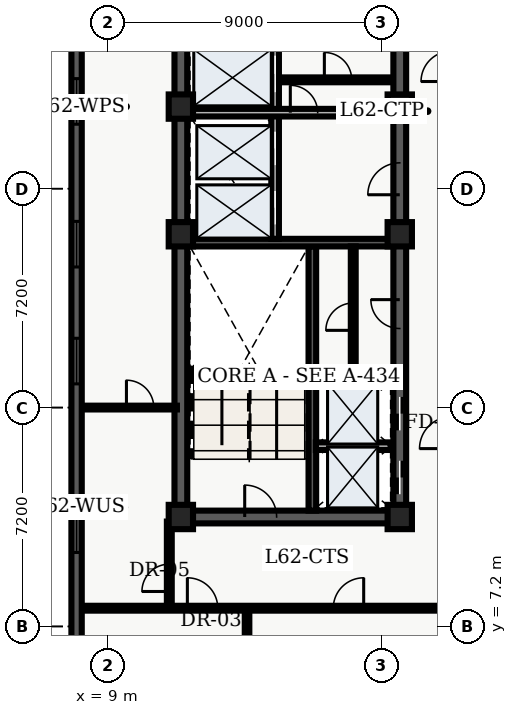
"""IFC4 building model, lengths in metres.
Left out: names, types, materials, properties, quantities, classifications, styles, units other than length and angle.
Written with IfcOpenShell. Run it as: python <this file> out.ifc"""

import sys

from ifc_helpers import new_model, entity, si_unit, converted_unit, direction, frame, origin_with_axes, origin_2d_with_axis, place, context, subcontext, project, spatial, polyline, rectangle, outline, extrude, element, fill, save


model = new_model("IFC4")
c1 = context("Model", 3, precision=1e-05, world=origin_with_axes(), true_north=direction((0.0, 1.0)))
c2 = subcontext(c1, "Body", "Model", "MODEL_VIEW")
j1 = project(units=[si_unit("LENGTHUNIT", "METRE"), converted_unit("PLANEANGLEUNIT", "DEGREE", entity("IfcPlaneAngleMeasure", 0.017), si_unit("PLANEANGLEUNIT", "RADIAN"), dimensions=[0, 0, 0, 0, 0, 0, 0])], contexts=[c1])
p1 = place(None, origin_with_axes())
s1 = spatial("IfcSite", under=j1, at=p1, CompositionType="ELEMENT")
p2 = place(p1, origin_with_axes())
s2 = spatial("IfcBuilding", under=s1, at=p2, CompositionType="ELEMENT")
p3 = place(p2, frame((0.0, 0.0, 252.9), z_axis=(0.0, 0.0, 1.0), x_axis=(1.0, 0.0, 0.0)))
s3 = spatial("IfcBuildingStorey", under=s2, at=p3, CompositionType="ELEMENT", Elevation=252.9)
p4 = place(p3, frame((11.4, 10.8, 0.0), z_axis=(0.0, 0.0, 1.0), x_axis=(0.0, 1.0, 0.0)))
e1 = element("IfcWall", 1, at=p4, inside=s3, PredefinedType="SHEAR", context=c2, shape_type="SweptSolid", body=[
    extrude(outline(polyline([(0.0, -0.21), (27.0, -0.21), (27.0, 0.21), (0.0, 0.21), (0.0, -0.21)])), origin_with_axes(), (0.0, 0.0, 1.0), 3.66),
])
p5 = place(p3, frame((11.4, 10.8, 0.0), z_axis=(0.0, 0.0, 1.0), x_axis=(1.0, 0.0, 0.0)))
e2 = element("IfcWall", 2, at=p5, inside=s3, PredefinedType="SHEAR", context=c2, shape_type="SweptSolid", body=[
    extrude(outline(polyline([(0.0, -0.21), (7.2, -0.21), (7.2, 0.21), (0.0, 0.21), (0.0, -0.21)])), origin_with_axes(), (0.0, 0.0, 1.0), 3.66),
])
p6 = place(p5, frame((2.625, 0.0, 0.0), z_axis=(0.0, 0.0, 1.0), x_axis=(1.0, 0.0, 0.0)))
e3 = element("IfcOpeningElement", 3, at=p6, cuts=e2, PredefinedType="OPENING", context=c2, shape_type="SweptSolid", body=[
    extrude(rectangle(XDim=1.05, YDim=0.44, at=origin_2d_with_axis()), origin_with_axes(), (0.0, 0.0, 1.0), 2.15),
])
p7 = place(p3, frame((18.6, 10.8, 0.0), z_axis=(0.0, 0.0, 1.0), x_axis=(0.0, 1.0, 0.0)))
e4 = element("IfcWall", 4, at=p7, inside=s3, PredefinedType="SHEAR", context=c2, shape_type="SweptSolid", body=[
    extrude(outline(polyline([(0.0, -0.21), (13.5, -0.21), (13.5, 0.21), (0.0, 0.21), (0.0, -0.21)])), origin_with_axes(), (0.0, 0.0, 1.0), 3.66),
])
p8 = place(p7, frame((1.3, 0.0, 0.0), z_axis=(0.0, 0.0, 1.0), x_axis=(1.0, 0.0, 0.0)))
e5 = element("IfcOpeningElement", 5, at=p8, cuts=e4, PredefinedType="OPENING", context=c2, shape_type="SweptSolid", body=[
    extrude(rectangle(XDim=1.1, YDim=0.44, at=origin_2d_with_axis()), origin_with_axes(), (0.0, 0.0, 1.0), 2.15),
])
p9 = place(p7, frame((3.4, 0.0, 0.0), z_axis=(0.0, 0.0, 1.0), x_axis=(1.0, 0.0, 0.0)))
e6 = element("IfcOpeningElement", 6, at=p9, cuts=e4, PredefinedType="OPENING", context=c2, shape_type="SweptSolid", body=[
    extrude(rectangle(XDim=1.1, YDim=0.44, at=origin_2d_with_axis()), origin_with_axes(), (0.0, 0.0, 1.0), 2.15),
])
p10 = place(p7, frame((11.125, 0.0, 0.0), z_axis=(0.0, 0.0, 1.0), x_axis=(1.0, 0.0, 0.0)))
e7 = element("IfcOpeningElement", 7, at=p10, cuts=e4, PredefinedType="OPENING", context=c2, shape_type="SweptSolid", body=[
    extrude(rectangle(XDim=1.05, YDim=0.44, at=origin_2d_with_axis()), origin_with_axes(), (0.0, 0.0, 1.0), 2.15),
])
p11 = place(p7, frame((6.675, 0.0, 0.0), z_axis=(0.0, 0.0, 1.0), x_axis=(1.0, 0.0, 0.0)))
e8 = element("IfcOpeningElement", 8, at=p11, cuts=e4, PredefinedType="OPENING", context=c2, shape_type="SweptSolid", body=[
    extrude(rectangle(XDim=0.95, YDim=0.44, at=origin_2d_with_axis()), origin_with_axes(), (0.0, 0.0, 1.0), 2.15),
])
p12 = place(p3, frame((18.6, 24.3, 0.0), z_axis=(0.0, 0.0, 1.0), x_axis=(0.0, 1.0, 0.0)))
e9 = element("IfcWall", 9, at=p12, inside=s3, PredefinedType="SHEAR", context=c2, shape_type="SweptSolid", body=[
    extrude(outline(polyline([(0.0, -0.21), (13.5, -0.21), (13.5, 0.21), (0.0, 0.21), (0.0, -0.21)])), origin_with_axes(), (0.0, 0.0, 1.0), 3.66),
])
p13 = place(p12, frame((6.725, 0.0, 0.0), z_axis=(0.0, 0.0, 1.0), x_axis=(1.0, 0.0, 0.0)))
e10 = element("IfcOpeningElement", 10, at=p13, cuts=e9, PredefinedType="OPENING", context=c2, shape_type="SweptSolid", body=[
    extrude(rectangle(XDim=1.05, YDim=0.44, at=origin_2d_with_axis()), origin_with_axes(), (0.0, 0.0, 1.0), 2.15),
])
p14 = place(p12, frame((11.125, 0.0, 0.0), z_axis=(0.0, 0.0, 1.0), x_axis=(1.0, 0.0, 0.0)))
e11 = element("IfcOpeningElement", 11, at=p14, cuts=e9, PredefinedType="OPENING", context=c2, shape_type="SweptSolid", body=[
    extrude(rectangle(XDim=1.05, YDim=0.44, at=origin_2d_with_axis()), origin_with_axes(), (0.0, 0.0, 1.0), 2.15),
])
p15 = place(p3, frame((15.725, 11.01, 0.0), z_axis=(0.0, 0.0, 1.0), x_axis=(0.0, 1.0, 0.0)))
e12 = element("IfcWall", 12, at=p15, inside=s3, PredefinedType="SHEAR", context=c2, shape_type="SweptSolid", body=[
    extrude(outline(polyline([(0.0, -0.125), (8.69, -0.125), (8.69, 0.125), (0.0, 0.125), (0.0, -0.125)])), origin_with_axes(), (0.0, 0.0, 1.0), 3.66),
])
p16 = place(p3, frame((11.61, 19.825, 0.0), z_axis=(0.0, 0.0, 1.0), x_axis=(1.0, 0.0, 0.0)))
e13 = element("IfcWall", 13, at=p16, inside=s3, PredefinedType="SHEAR", context=c2, shape_type="SweptSolid", body=[
    extrude(outline(polyline([(0.0, -0.125), (6.78, -0.125), (6.78, 0.125), (0.0, 0.125), (0.0, -0.125)])), origin_with_axes(), (0.0, 0.0, 1.0), 3.66),
])
p17 = place(p3, frame((14.5, 19.95, 0.0), z_axis=(0.0, 0.0, 1.0), x_axis=(0.0, 1.0, 0.0)))
e14 = element("IfcWall", 14, at=p17, inside=s3, PredefinedType="SOLIDWALL", context=c2, shape_type="SweptSolid", body=[
    extrude(outline(polyline([(0.0, -0.125), (6.25, -0.125), (6.25, 0.125), (0.0, 0.125), (0.0, -0.125)])), origin_with_axes(), (0.0, 0.0, 1.0), 2.7),
])
p18 = place(p17, frame((1.025, 0.0, 0.0), z_axis=(0.0, 0.0, 1.0), x_axis=(1.0, 0.0, 0.0)))
e15 = element("IfcOpeningElement", 15, at=p18, cuts=e14, PredefinedType="OPENING", context=c2, shape_type="SweptSolid", body=[
    extrude(rectangle(XDim=1.1, YDim=0.27, at=origin_2d_with_axis()), origin_with_axes(), (0.0, 0.0, 1.0), 2.15),
])
p19 = place(p17, frame((2.975, 0.0, 0.0), z_axis=(0.0, 0.0, 1.0), x_axis=(1.0, 0.0, 0.0)))
e16 = element("IfcOpeningElement", 16, at=p19, cuts=e14, PredefinedType="OPENING", context=c2, shape_type="SweptSolid", body=[
    extrude(rectangle(XDim=1.1, YDim=0.27, at=origin_2d_with_axis()), origin_with_axes(), (0.0, 0.0, 1.0), 2.15),
])
p20 = place(p17, frame((5.425, 0.0, 0.0), z_axis=(0.0, 0.0, 1.0), x_axis=(1.0, 0.0, 0.0)))
e17 = element("IfcOpeningElement", 17, at=p20, cuts=e14, PredefinedType="OPENING", context=c2, shape_type="SweptSolid", body=[
    extrude(rectangle(XDim=1.2, YDim=0.27, at=origin_2d_with_axis()), origin_with_axes(), (0.0, 0.0, 1.0), 2.15),
])
p21 = place(p3, frame((11.7, 24.1, 0.0), z_axis=(0.0, 0.0, 1.0), x_axis=(1.0, 0.0, 0.0)))
e18 = element("IfcWall", 18, at=p21, inside=s3, PredefinedType="SOLIDWALL", context=c2, shape_type="SweptSolid", body=[
    extrude(outline(polyline([(0.0, -0.125), (6.6, -0.125), (6.6, 0.125), (0.0, 0.125), (0.0, -0.125)])), origin_with_axes(), (0.0, 0.0, 1.0), 2.7),
])
p22 = place(p21, frame((3.75, 0.0, 0.0), z_axis=(0.0, 0.0, 1.0), x_axis=(1.0, 0.0, 0.0)))
e19 = element("IfcOpeningElement", 19, at=p22, cuts=e18, PredefinedType="OPENING", context=c2, shape_type="SweptSolid", body=[
    extrude(rectangle(XDim=0.9, YDim=0.27, at=origin_2d_with_axis()), origin_with_axes(), (0.0, 0.0, 1.0), 2.15),
])
for number, where, z_axis, x_axis in (
    (20, (11.4, 10.8, 0.0), (0.0, 0.0, 1.0), (1.0, 0.0, 0.0)),
    (21, (11.4, 20.1, 0.0), (0.0, 0.0, 1.0), (1.0, 0.0, 0.0)),
    (22, (11.4, 24.3, 0.0), (0.0, 0.0, 1.0), (1.0, 0.0, 0.0)),
    (23, (18.6, 10.8, 0.0), (0.0, 0.0, 1.0), (1.0, 0.0, 0.0)),
    (24, (18.6, 20.1, 0.0), (0.0, 0.0, 1.0), (1.0, 0.0, 0.0)),
    (25, (18.6, 24.3, 0.0), (0.0, 0.0, 1.0), (1.0, 0.0, 0.0)),
):
    element("IfcColumn", number, at=place(p3, frame(where, z_axis=z_axis, x_axis=x_axis)), inside=s3, PredefinedType="COLUMN", context=c2, shape_type="SweptSolid", body=[
        extrude(rectangle(XDim=0.8, YDim=0.8, at=origin_2d_with_axis()), origin_with_axes(), (0.0, 0.0, 1.0), 3.9),
    ])
p23 = place(p3, frame((14.62, 25.18, 0.0), z_axis=(0.0, 0.0, 1.0), x_axis=(1.0, 0.0, 0.0)))
e26 = element("IfcWall", 26, at=p23, inside=s3, PredefinedType="PARTITIONING", context=c2, shape_type="SweptSolid", body=[
    extrude(outline(polyline([(0.0, -0.08), (3.68, -0.08), (3.68, 0.08), (0.0, 0.08), (0.0, -0.08)])), origin_with_axes(), (0.0, 0.0, 1.0), 2.7),
])
p24 = place(p23, frame((1.95, 0.0, 0.0), z_axis=(0.0, 0.0, 1.0), x_axis=(1.0, 0.0, 0.0)))
e27 = element("IfcOpeningElement", 27, at=p24, cuts=e26, PredefinedType="OPENING", context=c2, shape_type="SweptSolid", body=[
    extrude(rectangle(XDim=0.9, YDim=0.18, at=origin_2d_with_axis()), origin_with_axes(), (0.0, 0.0, 1.0), 2.15),
])
for number, where, z_axis, x_axis in (
    (28, (15.84, 13.13, 0.0), (0.0, 0.0, 1.0), (1.0, 0.0, 0.0)),
    (29, (15.84, 15.27, 0.0), (0.0, 0.0, 1.0), (1.0, 0.0, 0.0)),
):
    element("IfcWall", number, at=place(p3, frame(where, z_axis=z_axis, x_axis=x_axis)), inside=s3, PredefinedType="SOLIDWALL", context=c2, shape_type="SweptSolid", body=[
        extrude(outline(polyline([(0.0, -0.125), (2.46, -0.125), (2.46, 0.125), (0.0, 0.125), (0.0, -0.125)])), origin_with_axes(), (0.0, 0.0, 1.0), 2.7),
    ])
p25 = place(p3, frame((17.07, 15.34, 0.0), z_axis=(0.0, 0.0, 1.0), x_axis=(0.0, 1.0, 0.0)))
e30 = element("IfcWall", 30, at=p25, inside=s3, PredefinedType="PARTITIONING", context=c2, shape_type="SweptSolid", body=[
    extrude(outline(polyline([(0.0, -0.08), (4.36, -0.08), (4.36, 0.08), (0.0, 0.08), (0.0, -0.08)])), origin_with_axes(), (0.0, 0.0, 1.0), 2.7),
])
p26 = place(p25, frame((2.05, 0.0, 0.0), z_axis=(0.0, 0.0, 1.0), x_axis=(1.0, 0.0, 0.0)))
e31 = element("IfcOpeningElement", 31, at=p26, cuts=e30, PredefinedType="OPENING", context=c2, shape_type="SweptSolid", body=[
    extrude(rectangle(XDim=0.9, YDim=0.18, at=origin_2d_with_axis()), origin_with_axes(), (0.0, 0.0, 1.0), 2.15),
])
p27 = place(p3, frame((8.135, 7.8, 0.0), z_axis=(0.0, 0.0, 1.0), x_axis=(1.0, 0.0, 0.0)))
e32 = element("IfcWall", 32, at=p27, inside=s3, PredefinedType="PARTITIONING", context=c2, shape_type="SweptSolid", body=[
    extrude(outline(polyline([(0.0, -0.08), (12.165, -0.08), (12.165, 0.08), (0.0, 0.08), (0.0, -0.08)])), origin_with_axes(), (0.0, 0.0, 1.0), 2.7),
])
p28 = place(p27, frame((3.979, 0.0, 0.0), z_axis=(0.0, 0.0, 1.0), x_axis=(1.0, 0.0, 0.0)))
e33 = element("IfcOpeningElement", 33, at=p28, cuts=e32, PredefinedType="OPENING", context=c2, shape_type="SweptSolid", body=[
    extrude(rectangle(XDim=1.0, YDim=0.18, at=origin_2d_with_axis()), origin_with_axes(), (0.0, 0.0, 1.0), 2.15),
])
p29 = place(p27, frame((8.778, 0.0, 0.0), z_axis=(0.0, 0.0, 1.0), x_axis=(1.0, 0.0, 0.0)))
e34 = element("IfcOpeningElement", 34, at=p29, cuts=e32, PredefinedType="OPENING", context=c2, shape_type="SweptSolid", body=[
    extrude(rectangle(XDim=1.0, YDim=0.18, at=origin_2d_with_axis()), origin_with_axes(), (0.0, 0.0, 1.0), 2.15),
])
p30 = place(p3, frame((11.02, 7.8, 0.0), z_axis=(0.0, 0.0, 1.0), x_axis=(0.0, 1.0, 0.0)))
e35 = element("IfcWall", 35, at=p30, inside=s3, PredefinedType="PARTITIONING", context=c2, shape_type="SweptSolid", body=[
    extrude(outline(polyline([(0.0, -0.08), (2.85, -0.08), (2.85, 0.08), (0.0, 0.08), (0.0, -0.08)])), origin_with_axes(), (0.0, 0.0, 1.0), 2.7),
])
p31 = place(p30, frame((1.0, 0.0, 0.0), z_axis=(0.0, 0.0, 1.0), x_axis=(1.0, 0.0, 0.0)))
e36 = element("IfcOpeningElement", 36, at=p31, cuts=e35, PredefinedType="OPENING", context=c2, shape_type="SweptSolid", body=[
    extrude(rectangle(XDim=0.9, YDim=0.18, at=origin_2d_with_axis()), origin_with_axes(), (0.0, 0.0, 1.0), 2.15),
])
p32 = place(p3, frame((8.135, 14.4, 0.0), z_axis=(0.0, 0.0, 1.0), x_axis=(1.0, 0.0, 0.0)))
e37 = element("IfcWall", 37, at=p32, inside=s3, PredefinedType="PARTITIONING", context=c2, shape_type="SweptSolid", body=[
    extrude(outline(polyline([(0.0, -0.062), (3.135, -0.062), (3.135, 0.062), (0.0, 0.062), (0.0, -0.062)])), origin_with_axes(), (0.0, 0.0, 1.0), 2.7),
])
p33 = place(p32, frame((1.925, 0.0, 0.0), z_axis=(0.0, 0.0, 1.0), x_axis=(1.0, 0.0, 0.0)))
e38 = element("IfcOpeningElement", 38, at=p33, cuts=e37, PredefinedType="OPENING", context=c2, shape_type="SweptSolid", body=[
    extrude(rectangle(XDim=0.9, YDim=0.145, at=origin_2d_with_axis()), origin_with_axes(), (0.0, 0.0, 1.0), 2.15),
])
p34 = place(p3, frame((13.577, 2.58, 0.0), z_axis=(0.0, 0.0, 1.0), x_axis=(0.0, 1.0, 0.0)))
e39 = element("IfcWall", 39, at=p34, inside=s3, PredefinedType="PARTITIONING", context=c2, shape_type="SweptSolid", body=[
    extrude(outline(polyline([(0.0, -0.075), (5.12, -0.075), (5.12, 0.075), (0.0, 0.075), (0.0, -0.075)])), origin_with_axes(), (0.0, 0.0, 1.0), 2.7),
])
p35 = place(p3, frame((7.97, 2.74, 0.0), z_axis=(0.0, 0.0, 1.0), x_axis=(0.0, 1.0, 0.0)))
e40 = element("IfcWall", 40, at=p35, inside=s3, PredefinedType="SOLIDWALL", context=c2, shape_type="SweptSolid", body=[
    extrude(outline(polyline([(0.0, -0.17), (43.46, -0.17), (43.46, 0.17), (0.0, 0.17), (0.0, -0.17)])), origin_with_axes(), (0.0, 0.0, 1.0), 3.66),
])
p36 = place(p35, frame((2.948, 0.0, 0.45), z_axis=(0.0, 0.0, 1.0), x_axis=(1.0, 0.0, 0.0)))
e41 = element("IfcOpeningElement", 41, at=p36, cuts=e40, PredefinedType="OPENING", context=c2, shape_type="SweptSolid", body=[
    extrude(rectangle(XDim=1.5, YDim=0.36, at=origin_2d_with_axis()), origin_with_axes(), (0.0, 0.0, 1.0), 2.1),
])
p37 = place(p35, frame((7.643, 0.0, 0.45), z_axis=(0.0, 0.0, 1.0), x_axis=(1.0, 0.0, 0.0)))
e42 = element("IfcOpeningElement", 42, at=p37, cuts=e40, PredefinedType="OPENING", context=c2, shape_type="SweptSolid", body=[
    extrude(rectangle(XDim=1.5, YDim=0.36, at=origin_2d_with_axis()), origin_with_axes(), (0.0, 0.0, 1.0), 2.1),
])
p38 = place(p35, frame((13.189, 0.0, 0.45), z_axis=(0.0, 0.0, 1.0), x_axis=(1.0, 0.0, 0.0)))
e43 = element("IfcOpeningElement", 43, at=p38, cuts=e40, PredefinedType="OPENING", context=c2, shape_type="SweptSolid", body=[
    extrude(rectangle(XDim=1.5, YDim=0.36, at=origin_2d_with_axis()), origin_with_axes(), (0.0, 0.0, 1.0), 2.1),
])
p39 = place(p35, frame((17.034, 0.0, 0.45), z_axis=(0.0, 0.0, 1.0), x_axis=(1.0, 0.0, 0.0)))
e44 = element("IfcOpeningElement", 44, at=p39, cuts=e40, PredefinedType="OPENING", context=c2, shape_type="SweptSolid", body=[
    extrude(rectangle(XDim=1.5, YDim=0.36, at=origin_2d_with_axis()), origin_with_axes(), (0.0, 0.0, 1.0), 2.1),
])
p40 = place(p35, frame((21.73, 0.0, 0.45), z_axis=(0.0, 0.0, 1.0), x_axis=(1.0, 0.0, 0.0)))
e45 = element("IfcOpeningElement", 45, at=p40, cuts=e40, PredefinedType="OPENING", context=c2, shape_type="SweptSolid", body=[
    extrude(rectangle(XDim=1.5, YDim=0.36, at=origin_2d_with_axis()), origin_with_axes(), (0.0, 0.0, 1.0), 2.1),
])
p41 = place(p35, frame((26.426, 0.0, 0.45), z_axis=(0.0, 0.0, 1.0), x_axis=(1.0, 0.0, 0.0)))
e46 = element("IfcOpeningElement", 46, at=p41, cuts=e40, PredefinedType="OPENING", context=c2, shape_type="SweptSolid", body=[
    extrude(rectangle(XDim=1.5, YDim=0.36, at=origin_2d_with_axis()), origin_with_axes(), (0.0, 0.0, 1.0), 2.1),
])
p42 = place(p35, frame((35.817, 0.0, 0.45), z_axis=(0.0, 0.0, 1.0), x_axis=(1.0, 0.0, 0.0)))
e47 = element("IfcOpeningElement", 47, at=p42, cuts=e40, PredefinedType="OPENING", context=c2, shape_type="SweptSolid", body=[
    extrude(rectangle(XDim=1.5, YDim=0.36, at=origin_2d_with_axis()), origin_with_axes(), (0.0, 0.0, 1.0), 2.1),
])
p43 = place(p35, frame((40.512, 0.0, 0.45), z_axis=(0.0, 0.0, 1.0), x_axis=(1.0, 0.0, 0.0)))
e48 = element("IfcOpeningElement", 48, at=p43, cuts=e40, PredefinedType="OPENING", context=c2, shape_type="SweptSolid", body=[
    extrude(rectangle(XDim=1.5, YDim=0.36, at=origin_2d_with_axis()), origin_with_axes(), (0.0, 0.0, 1.0), 2.1),
])
p44 = place(p7, frame((1.3, 0.0, 0.0), z_axis=(0.0, 0.0, 1.0), x_axis=(1.0, 0.0, 0.0)))
e49 = element("IfcDoor", 49, at=p44, inside=s3, OperationType="SLIDING_TO_LEFT", PredefinedType="DOOR", context=c2, shape_type="SweptSolid", body=[
    extrude(rectangle(XDim=1.1, YDim=0.09, at=origin_2d_with_axis()), origin_with_axes(), (0.0, 0.0, 1.0), 2.15),
])
fill(e5, e49)
p45 = place(p7, frame((3.4, 0.0, 0.0), z_axis=(0.0, 0.0, 1.0), x_axis=(1.0, 0.0, 0.0)))
e50 = element("IfcDoor", 50, at=p45, inside=s3, OperationType="SLIDING_TO_RIGHT", PredefinedType="DOOR", context=c2, shape_type="SweptSolid", body=[
    extrude(rectangle(XDim=1.1, YDim=0.09, at=origin_2d_with_axis()), origin_with_axes(), (0.0, 0.0, 1.0), 2.15),
])
fill(e6, e50)
p46 = place(p17, frame((1.025, 0.0, 0.0), z_axis=(0.0, 0.0, 1.0), x_axis=(1.0, 0.0, 0.0)))
e51 = element("IfcDoor", 51, at=p46, inside=s3, OperationType="SLIDING_TO_LEFT", PredefinedType="DOOR", context=c2, shape_type="SweptSolid", body=[
    extrude(rectangle(XDim=1.1, YDim=0.09, at=origin_2d_with_axis()), origin_with_axes(), (0.0, 0.0, 1.0), 2.15),
])
fill(e15, e51)
p47 = place(p17, frame((2.975, 0.0, 0.0), z_axis=(0.0, 0.0, 1.0), x_axis=(1.0, 0.0, 0.0)))
e52 = element("IfcDoor", 52, at=p47, inside=s3, OperationType="SLIDING_TO_RIGHT", PredefinedType="DOOR", context=c2, shape_type="SweptSolid", body=[
    extrude(rectangle(XDim=1.1, YDim=0.09, at=origin_2d_with_axis()), origin_with_axes(), (0.0, 0.0, 1.0), 2.15),
])
fill(e16, e52)
p48 = place(p17, frame((5.425, 0.0, 0.0), z_axis=(0.0, 0.0, 1.0), x_axis=(1.0, 0.0, 0.0)))
e53 = element("IfcDoor", 53, at=p48, inside=s3, OperationType="DOUBLE_DOOR_SLIDING", PredefinedType="DOOR", context=c2, shape_type="SweptSolid", body=[
    extrude(rectangle(XDim=1.2, YDim=0.09, at=origin_2d_with_axis()), origin_with_axes(), (0.0, 0.0, 1.0), 2.15),
])
fill(e17, e53)
p49 = place(p5, frame((2.625, 0.0, 0.0), z_axis=(0.0, 0.0, 1.0), x_axis=(1.0, 0.0, 0.0)))
e54 = element("IfcDoor", 54, at=p49, inside=s3, OperationType="SINGLE_SWING_LEFT", PredefinedType="DOOR", context=c2, shape_type="SweptSolid", body=[
    extrude(rectangle(XDim=1.05, YDim=0.09, at=origin_2d_with_axis()), origin_with_axes(), (0.0, 0.0, 1.0), 2.15),
])
fill(e3, e54)
p50 = place(p7, frame((11.125, 0.0, 0.0), z_axis=(0.0, 0.0, 1.0), x_axis=(1.0, 0.0, 0.0)))
e55 = element("IfcDoor", 55, at=p50, inside=s3, OperationType="SINGLE_SWING_LEFT", PredefinedType="DOOR", context=c2, shape_type="SweptSolid", body=[
    extrude(rectangle(XDim=1.05, YDim=0.09, at=origin_2d_with_axis()), origin_with_axes(), (0.0, 0.0, 1.0), 2.15),
])
fill(e7, e55)
p51 = place(p21, frame((3.75, 0.0, 0.0), z_axis=(0.0, 0.0, 1.0), x_axis=(1.0, 0.0, 0.0)))
e56 = element("IfcDoor", 56, at=p51, inside=s3, OperationType="SINGLE_SWING_LEFT", PredefinedType="DOOR", context=c2, shape_type="SweptSolid", body=[
    extrude(rectangle(XDim=0.9, YDim=0.09, at=origin_2d_with_axis()), origin_with_axes(), (0.0, 0.0, 1.0), 2.15),
])
fill(e19, e56)
p52 = place(p23, frame((1.95, 0.0, 0.0), z_axis=(0.0, 0.0, 1.0), x_axis=(1.0, 0.0, 0.0)))
e57 = element("IfcDoor", 57, at=p52, inside=s3, OperationType="SINGLE_SWING_LEFT", PredefinedType="DOOR", context=c2, shape_type="SweptSolid", body=[
    extrude(rectangle(XDim=0.9, YDim=0.09, at=origin_2d_with_axis()), origin_with_axes(), (0.0, 0.0, 1.0), 2.15),
])
fill(e27, e57)
p53 = place(p25, frame((2.05, 0.0, 0.0), z_axis=(0.0, 0.0, 1.0), x_axis=(1.0, 0.0, 0.0)))
e58 = element("IfcDoor", 58, at=p53, inside=s3, OperationType="SINGLE_SWING_LEFT", PredefinedType="DOOR", context=c2, shape_type="SweptSolid", body=[
    extrude(rectangle(XDim=0.9, YDim=0.09, at=origin_2d_with_axis()), origin_with_axes(), (0.0, 0.0, 1.0), 2.15),
])
fill(e31, e58)
p54 = place(p7, frame((6.675, 0.0, 0.0), z_axis=(0.0, 0.0, 1.0), x_axis=(1.0, 0.0, 0.0)))
e59 = element("IfcDoor", 59, at=p54, inside=s3, OperationType="SINGLE_SWING_RIGHT", PredefinedType="DOOR", context=c2, shape_type="SweptSolid", body=[
    extrude(rectangle(XDim=0.95, YDim=0.09, at=origin_2d_with_axis()), origin_with_axes(), (0.0, 0.0, 1.0), 2.15),
])
fill(e8, e59)
p55 = place(p30, frame((1.0, 0.0, 0.0), z_axis=(0.0, 0.0, 1.0), x_axis=(1.0, 0.0, 0.0)))
e60 = element("IfcDoor", 60, at=p55, inside=s3, OperationType="SINGLE_SWING_LEFT", PredefinedType="DOOR", context=c2, shape_type="SweptSolid", body=[
    extrude(rectangle(XDim=0.9, YDim=0.09, at=origin_2d_with_axis()), origin_with_axes(), (0.0, 0.0, 1.0), 2.15),
])
fill(e36, e60)
p56 = place(p32, frame((1.925, 0.0, 0.0), z_axis=(0.0, 0.0, 1.0), x_axis=(1.0, 0.0, 0.0)))
e61 = element("IfcDoor", 61, at=p56, inside=s3, OperationType="SINGLE_SWING_LEFT", PredefinedType="DOOR", context=c2, shape_type="SweptSolid", body=[
    extrude(rectangle(XDim=0.9, YDim=0.075, at=origin_2d_with_axis()), origin_with_axes(), (0.0, 0.0, 1.0), 2.15),
])
fill(e38, e61)
p57 = place(p27, frame((3.979, 0.0, 0.0), z_axis=(0.0, 0.0, 1.0), x_axis=(1.0, 0.0, 0.0)))
e62 = element("IfcDoor", 62, at=p57, inside=s3, OperationType="SINGLE_SWING_LEFT", PredefinedType="DOOR", context=c2, shape_type="SweptSolid", body=[
    extrude(rectangle(XDim=1.0, YDim=0.09, at=origin_2d_with_axis()), origin_with_axes(), (0.0, 0.0, 1.0), 2.15),
])
fill(e33, e62)
p58 = place(p27, frame((8.778, 0.0, 0.0), z_axis=(0.0, 0.0, 1.0), x_axis=(1.0, 0.0, 0.0)))
e63 = element("IfcDoor", 63, at=p58, inside=s3, OperationType="SINGLE_SWING_RIGHT", PredefinedType="DOOR", context=c2, shape_type="SweptSolid", body=[
    extrude(rectangle(XDim=1.0, YDim=0.09, at=origin_2d_with_axis()), origin_with_axes(), (0.0, 0.0, 1.0), 2.15),
])
fill(e34, e63)
p59 = place(p35, frame((7.643, 0.0, 0.45), z_axis=(0.0, 0.0, 1.0), x_axis=(1.0, 0.0, 0.0)))
e64 = element("IfcWindow", 64, at=p59, inside=s3, PredefinedType="WINDOW", context=c2, shape_type="SweptSolid", body=[
    extrude(rectangle(XDim=1.5, YDim=0.09, at=origin_2d_with_axis()), origin_with_axes(), (0.0, 0.0, 1.0), 2.1),
])
fill(e42, e64)
p60 = place(p35, frame((13.189, 0.0, 0.45), z_axis=(0.0, 0.0, 1.0), x_axis=(1.0, 0.0, 0.0)))
e65 = element("IfcWindow", 65, at=p60, inside=s3, PredefinedType="WINDOW", context=c2, shape_type="SweptSolid", body=[
    extrude(rectangle(XDim=1.5, YDim=0.09, at=origin_2d_with_axis()), origin_with_axes(), (0.0, 0.0, 1.0), 2.1),
])
fill(e43, e65)
p61 = place(p35, frame((17.034, 0.0, 0.45), z_axis=(0.0, 0.0, 1.0), x_axis=(1.0, 0.0, 0.0)))
e66 = element("IfcWindow", 66, at=p61, inside=s3, PredefinedType="WINDOW", context=c2, shape_type="SweptSolid", body=[
    extrude(rectangle(XDim=1.5, YDim=0.09, at=origin_2d_with_axis()), origin_with_axes(), (0.0, 0.0, 1.0), 2.1),
])
fill(e44, e66)
p62 = place(p35, frame((21.73, 0.0, 0.45), z_axis=(0.0, 0.0, 1.0), x_axis=(1.0, 0.0, 0.0)))
e67 = element("IfcWindow", 67, at=p62, inside=s3, PredefinedType="WINDOW", context=c2, shape_type="SweptSolid", body=[
    extrude(rectangle(XDim=1.5, YDim=0.09, at=origin_2d_with_axis()), origin_with_axes(), (0.0, 0.0, 1.0), 2.1),
])
fill(e45, e67)
save(model, sys.argv[1])
